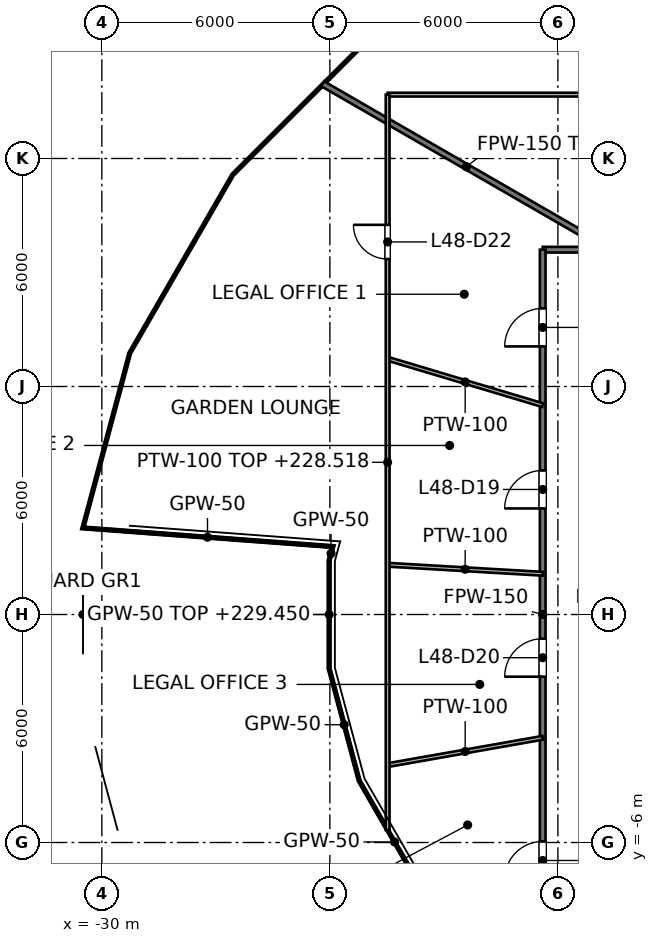
"""IFC4 building model, lengths in metres.
Left out: names, types, materials, properties, quantities, classifications, styles, units other than length and angle.
Written with IfcOpenShell. Run it as: python <this file> out.ifc"""

import sys

from ifc_helpers import new_model, si_unit, direction, frame, frame_2d, origin, place, context, subcontext, project, spatial, rectangle, extrude, element, fill, save


model = new_model("IFC4")
c1 = context("Model", 3, precision=1e-05, world=origin(), true_north=direction((0.0, 1.0)))
c2 = subcontext(c1, "Body", "Model", "MODEL_VIEW")
j1 = project(units=[si_unit("LENGTHUNIT", "METRE"), si_unit("PLANEANGLEUNIT", "RADIAN")], contexts=[c1])
p1 = place(None, origin())
s1 = spatial("IfcSite", under=j1, at=p1, CompositionType="ELEMENT")
p2 = place(p1, origin())
s2 = spatial("IfcBuilding", under=s1, at=p2, CompositionType="ELEMENT")
p3 = place(p2, frame((0.0, 0.0, 225.6)))
s3 = spatial("IfcBuildingStorey", under=s2, at=p3, CompositionType="ELEMENT", Elevation=225.6)
p4 = place(p3, frame((-24.19, 13.966, 0.0), z_axis=(0.0, 0.0, 1.0), x_axis=(0.866042650443, -0.499970126722, 0.0)))
e1 = element("IfcWall", 1, at=p4, inside=s3, PredefinedType="PARTITIONING", context=c2, shape_type="SweptSolid", body=[
    extrude(rectangle(XDim=8.732, YDim=0.15, at=frame_2d((4.366, 0.0))), origin(), (0.0, 0.0, 1.0), 3.076),
])
p5 = place(p3, frame((-18.4, 9.6, 0.0), z_axis=(0.0, 0.0, 1.0), x_axis=(1.0, 0.0, 0.0)))
e2 = element("IfcWall", 2, at=p5, inside=s3, PredefinedType="PARTITIONING", context=c2, shape_type="SweptSolid", body=[
    extrude(rectangle(XDim=36.8, YDim=0.15, at=frame_2d((18.4, 0.0))), origin(), (0.0, 0.0, 1.0), 2.927),
])
p6 = place(p5, frame((30.793, 0.0, 0.0)))
e3 = element("IfcOpeningElement", 3, at=p6, cuts=e2, PredefinedType="OPENING", context=c2, shape_type="SweptSolid", body=[
    extrude(rectangle(XDim=1.0, YDim=2.1, at=frame_2d((0.5, 1.05))), frame((0.0, 0.075, 0.0), z_axis=(0.0, -1.0, 0.0), x_axis=(1.0, 0.0, 0.0)), (0.0, 0.0, 1.0), 0.15),
])
p7 = place(p5, frame((24.84, 0.0, 0.0)))
e4 = element("IfcOpeningElement", 4, at=p7, cuts=e2, PredefinedType="OPENING", context=c2, shape_type="SweptSolid", body=[
    extrude(rectangle(XDim=1.0, YDim=2.1, at=frame_2d((0.5, 1.05))), frame((0.0, 0.075, 0.0), z_axis=(0.0, -1.0, 0.0), x_axis=(1.0, 0.0, 0.0)), (0.0, 0.0, 1.0), 0.15),
])
p8 = place(p5, frame((21.106, 0.0, 0.0)))
e5 = element("IfcOpeningElement", 5, at=p8, cuts=e2, PredefinedType="OPENING", context=c2, shape_type="SweptSolid", body=[
    extrude(rectangle(XDim=1.0, YDim=2.1, at=frame_2d((0.5, 1.05))), frame((0.0, 0.075, 0.0), z_axis=(0.0, -1.0, 0.0), x_axis=(1.0, 0.0, 0.0)), (0.0, 0.0, 1.0), 0.15),
])
p9 = place(p5, frame((17.46, 0.0, 0.0)))
e6 = element("IfcOpeningElement", 6, at=p9, cuts=e2, PredefinedType="OPENING", context=c2, shape_type="SweptSolid", body=[
    extrude(rectangle(XDim=1.0, YDim=2.1, at=frame_2d((0.5, 1.05))), frame((0.0, 0.075, 0.0), z_axis=(0.0, -1.0, 0.0), x_axis=(1.0, 0.0, 0.0)), (0.0, 0.0, 1.0), 0.15),
])
p10 = place(p5, frame((13.497, 0.0, 0.0)))
e7 = element("IfcOpeningElement", 7, at=p10, cuts=e2, PredefinedType="OPENING", context=c2, shape_type="SweptSolid", body=[
    extrude(rectangle(XDim=1.0, YDim=2.1, at=frame_2d((0.5, 1.05))), frame((0.0, 0.075, 0.0), z_axis=(0.0, -1.0, 0.0), x_axis=(1.0, 0.0, 0.0)), (0.0, 0.0, 1.0), 0.15),
])
p11 = place(p5, frame((6.418, 0.0, 0.0)))
e8 = element("IfcOpeningElement", 8, at=p11, cuts=e2, PredefinedType="OPENING", context=c2, shape_type="SweptSolid", body=[
    extrude(rectangle(XDim=1.0, YDim=2.1, at=frame_2d((0.5, 1.05))), frame((0.0, 0.075, 0.0), z_axis=(0.0, -1.0, 0.0), x_axis=(1.0, 0.0, 0.0)), (0.0, 0.0, 1.0), 0.15),
])
p12 = place(p3, frame((-18.4, -9.6, 0.0), z_axis=(0.0, 0.0, 1.0), x_axis=(0.0, 1.0, 0.0)))
e9 = element("IfcWall", 9, at=p12, inside=s3, PredefinedType="PARTITIONING", context=c2, shape_type="SweptSolid", body=[
    extrude(rectangle(XDim=19.2, YDim=0.15, at=frame_2d((9.6, 0.0))), origin(), (0.0, 0.0, 1.0), 2.918),
])
p13 = place(p12, frame((16.655, 0.0, 0.0)))
e10 = element("IfcOpeningElement", 10, at=p13, cuts=e9, PredefinedType="OPENING", context=c2, shape_type="SweptSolid", body=[
    extrude(rectangle(XDim=1.0, YDim=2.1, at=frame_2d((0.5, 1.05))), frame((0.0, 0.075, 0.0), z_axis=(0.0, -1.0, 0.0), x_axis=(1.0, 0.0, 0.0)), (0.0, 0.0, 1.0), 0.15),
])
p14 = place(p12, frame((12.39, 0.0, 0.0)))
e11 = element("IfcOpeningElement", 11, at=p14, cuts=e9, PredefinedType="OPENING", context=c2, shape_type="SweptSolid", body=[
    extrude(rectangle(XDim=1.0, YDim=2.1, at=frame_2d((0.5, 1.05))), frame((0.0, 0.075, 0.0), z_axis=(0.0, -1.0, 0.0), x_axis=(1.0, 0.0, 0.0)), (0.0, 0.0, 1.0), 0.15),
])
p15 = place(p12, frame((7.963, 0.0, 0.0)))
e12 = element("IfcOpeningElement", 12, at=p15, cuts=e9, PredefinedType="OPENING", context=c2, shape_type="SweptSolid", body=[
    extrude(rectangle(XDim=1.0, YDim=2.1, at=frame_2d((0.5, 1.05))), frame((0.0, 0.075, 0.0), z_axis=(0.0, -1.0, 0.0), x_axis=(1.0, 0.0, 0.0)), (0.0, 0.0, 1.0), 0.15),
])
p16 = place(p12, frame((2.627, 0.0, 0.0)))
e13 = element("IfcOpeningElement", 13, at=p16, cuts=e9, PredefinedType="OPENING", context=c2, shape_type="SweptSolid", body=[
    extrude(rectangle(XDim=1.0, YDim=2.1, at=frame_2d((0.5, 1.05))), frame((0.0, 0.075, 0.0), z_axis=(0.0, -1.0, 0.0), x_axis=(1.0, 0.0, 0.0)), (0.0, 0.0, 1.0), 0.15),
])
p17 = place(p3, frame((-24.019, -1.424, 0.0), z_axis=(0.0, 0.0, 1.0), x_axis=(0.259054071109, -0.965862820613, 0.0)))
e14 = element("IfcWall", 14, at=p17, inside=s3, PredefinedType="PARTITIONING", context=c2, shape_type="SweptSolid", body=[
    extrude(rectangle(XDim=3.057, YDim=0.05, at=frame_2d((1.529, 0.0))), origin(), (0.0, 0.0, 1.0), 2.918),
])
p18 = place(p3, frame((-23.227, -4.377, 0.0), z_axis=(0.0, 0.0, 1.0), x_axis=(0.49991400307, -0.866075048442, 0.0)))
e15 = element("IfcWall", 15, at=p18, inside=s3, PredefinedType="PARTITIONING", context=c2, shape_type="SweptSolid", body=[
    extrude(rectangle(XDim=3.715, YDim=0.05, at=frame_2d((1.857, 0.0))), origin(), (0.0, 0.0, 1.0), 2.918),
])
p19 = place(p3, frame((-30.519, 2.28, 0.0), z_axis=(0.0, 0.0, 1.0), x_axis=(0.997221144943, -0.074498242124, 0.0)))
e16 = element("IfcWall", 16, at=p19, inside=s3, PredefinedType="PARTITIONING", context=c2, shape_type="SweptSolid", body=[
    extrude(rectangle(XDim=6.616, YDim=0.05, at=frame_2d((3.308, 0.0))), origin(), (0.0, 0.0, 1.0), 2.918),
])
p20 = place(p3, frame((-24.019, 1.424, 0.0), z_axis=(0.0, 0.0, 1.0), x_axis=(0.260974429676, 0.96534571375, 0.0)))
e17 = element("IfcWall", 17, at=p20, inside=s3, PredefinedType="PARTITIONING", context=c2, shape_type="SweptSolid", body=[
    extrude(rectangle(XDim=0.376, YDim=0.05, at=frame_2d((0.188, 0.0))), origin(), (0.0, 0.0, 1.0), 2.918),
])
p21 = place(p3, frame((-24.019, -1.424, 0.0), z_axis=(0.0, 0.0, 1.0), x_axis=(0.0, 1.0, 0.0)))
e18 = element("IfcWall", 18, at=p21, inside=s3, PredefinedType="PARTITIONING", context=c2, shape_type="SweptSolid", body=[
    extrude(rectangle(XDim=2.848, YDim=0.05, at=frame_2d((1.424, 0.0))), origin(), (0.0, 0.0, 1.0), 3.85),
])
p22 = place(p3, frame((-22.48, 6.73, 0.0), z_axis=(0.0, 0.0, 1.0), x_axis=(0.958024854744, -0.286685154295, 0.0)))
e19 = element("IfcWall", 19, at=p22, inside=s3, PredefinedType="PARTITIONING", context=c2, shape_type="SweptSolid", body=[
    extrude(rectangle(XDim=4.259, YDim=0.1, at=frame_2d((2.129, 0.0))), origin(), (0.0, 0.0, 1.0), 3.85),
])
p23 = place(p3, frame((-22.48, 1.309, 0.0), z_axis=(0.0, 0.0, 1.0), x_axis=(0.998316342586, -0.058004138861, 0.0)))
e20 = element("IfcWall", 20, at=p23, inside=s3, PredefinedType="PARTITIONING", context=c2, shape_type="SweptSolid", body=[
    extrude(rectangle(XDim=4.087, YDim=0.1, at=frame_2d((2.043, 0.0))), origin(), (0.0, 0.0, 1.0), 3.85),
])
p24 = place(p3, frame((-22.48, 13.68, 0.0), z_axis=(0.0, 0.0, 1.0), x_axis=(1.0, 0.0, 0.0)))
e21 = element("IfcWall", 21, at=p24, inside=s3, PredefinedType="PARTITIONING", context=c2, shape_type="SweptSolid", body=[
    extrude(rectangle(XDim=44.96, YDim=0.1, at=frame_2d((22.48, 0.0))), origin(), (0.0, 0.0, 1.0), 2.927),
])
p25 = place(p24, frame((20.954, 0.0, 0.0)))
e22 = element("IfcOpeningElement", 22, at=p25, cuts=e21, PredefinedType="OPENING", context=c2, shape_type="SweptSolid", body=[
    extrude(rectangle(XDim=1.8, YDim=2.1, at=frame_2d((0.9, 1.05))), frame((0.0, 0.05, 0.0), z_axis=(0.0, -1.0, 0.0), x_axis=(1.0, 0.0, 0.0)), (0.0, 0.0, 1.0), 0.1),
])
p26 = place(p24, frame((6.348, 0.0, 0.0)))
e23 = element("IfcOpeningElement", 23, at=p26, cuts=e21, PredefinedType="OPENING", context=c2, shape_type="SweptSolid", body=[
    extrude(rectangle(XDim=0.9, YDim=2.1, at=frame_2d((0.45, 1.05))), frame((0.0, 0.05, 0.0), z_axis=(0.0, -1.0, 0.0), x_axis=(1.0, 0.0, 0.0)), (0.0, 0.0, 1.0), 0.1),
])
p27 = place(p3, frame((-22.48, -3.964, 0.0), z_axis=(0.0, 0.0, 1.0), x_axis=(0.984825650465, 0.173546645561, 0.0)))
e24 = element("IfcWall", 24, at=p27, inside=s3, PredefinedType="PARTITIONING", context=c2, shape_type="SweptSolid", body=[
    extrude(rectangle(XDim=4.143, YDim=0.1, at=frame_2d((2.072, 0.0))), origin(), (0.0, 0.0, 1.0), 3.85),
])
p28 = place(p3, frame((-22.48, -5.671, 0.0), z_axis=(0.0, 0.0, 1.0), x_axis=(0.0, 1.0, 0.0)))
e25 = element("IfcWall", 25, at=p28, inside=s3, PredefinedType="PARTITIONING", context=c2, shape_type="SweptSolid", body=[
    extrude(rectangle(XDim=19.351, YDim=0.1, at=frame_2d((9.675, 0.0))), origin(), (0.0, 0.0, 1.0), 2.918),
])
p29 = place(p28, frame((15.025, 0.0, 0.0)))
e26 = element("IfcOpeningElement", 26, at=p29, cuts=e25, PredefinedType="OPENING", context=c2, shape_type="SweptSolid", body=[
    extrude(rectangle(XDim=0.9, YDim=2.1, at=frame_2d((0.45, 1.05))), frame((0.0, 0.05, 0.0), z_axis=(0.0, -1.0, 0.0), x_axis=(1.0, 0.0, 0.0)), (0.0, 0.0, 1.0), 0.1),
])
p30 = place(p13, origin())
e27 = element("IfcDoor", 27, at=p30, inside=s3, OperationType="SINGLE_SWING_LEFT", PredefinedType="DOOR", context=c2, shape_type="SweptSolid", body=[
    extrude(rectangle(XDim=1.0, YDim=2.1, at=frame_2d((0.5, 1.05))), frame((0.0, 0.025, 0.0), z_axis=(0.0, -1.0, 0.0), x_axis=(1.0, 0.0, 0.0)), (0.0, 0.0, 1.0), 0.05),
])
fill(e10, e27)
p31 = place(p14, origin())
e28 = element("IfcDoor", 28, at=p31, inside=s3, OperationType="SINGLE_SWING_LEFT", PredefinedType="DOOR", context=c2, shape_type="SweptSolid", body=[
    extrude(rectangle(XDim=1.0, YDim=2.1, at=frame_2d((0.5, 1.05))), frame((0.0, 0.025, 0.0), z_axis=(0.0, -1.0, 0.0), x_axis=(1.0, 0.0, 0.0)), (0.0, 0.0, 1.0), 0.05),
])
fill(e11, e28)
p32 = place(p15, origin())
e29 = element("IfcDoor", 29, at=p32, inside=s3, OperationType="SINGLE_SWING_LEFT", PredefinedType="DOOR", context=c2, shape_type="SweptSolid", body=[
    extrude(rectangle(XDim=1.0, YDim=2.1, at=frame_2d((0.5, 1.05))), frame((0.0, 0.025, 0.0), z_axis=(0.0, -1.0, 0.0), x_axis=(1.0, 0.0, 0.0)), (0.0, 0.0, 1.0), 0.05),
])
fill(e12, e29)
p33 = place(p16, origin())
e30 = element("IfcDoor", 30, at=p33, inside=s3, OperationType="SINGLE_SWING_LEFT", PredefinedType="DOOR", context=c2, shape_type="SweptSolid", body=[
    extrude(rectangle(XDim=1.0, YDim=2.1, at=frame_2d((0.5, 1.05))), frame((0.0, 0.025, 0.0), z_axis=(0.0, -1.0, 0.0), x_axis=(1.0, 0.0, 0.0)), (0.0, 0.0, 1.0), 0.05),
])
fill(e13, e30)
p34 = place(p29, origin())
e31 = element("IfcDoor", 31, at=p34, inside=s3, OperationType="SINGLE_SWING_RIGHT", PredefinedType="DOOR", context=c2, shape_type="SweptSolid", body=[
    extrude(rectangle(XDim=0.9, YDim=2.1, at=frame_2d((0.45, 1.05))), frame((0.0, 0.025, 0.0), z_axis=(0.0, -1.0, 0.0), x_axis=(1.0, 0.0, 0.0)), (0.0, 0.0, 1.0), 0.05),
])
fill(e26, e31)
save(model, sys.argv[1])
